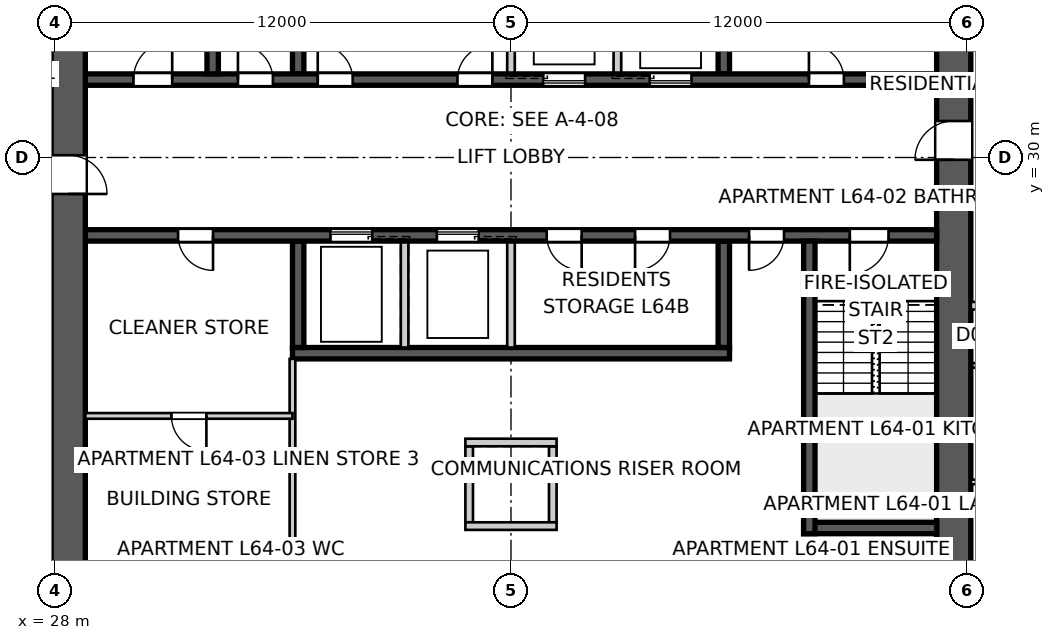
"""IFC4 building model, lengths in metres.
Left out: names, types, materials, properties, quantities, classifications, styles, units other than length and angle.
Written with IfcOpenShell. Run it as: python <this file> out.ifc"""

import sys

from ifc_helpers import new_model, si_unit, direction, frame, frame_2d, origin, place, context, subcontext, project, spatial, polyline, rectangle, outline, extrude, element, fill, save


model = new_model("IFC4")
c1 = context("Model", 3, precision=1e-05, world=origin(), true_north=direction((0.0, 1.0)))
c2 = subcontext(c1, "Body", "Model", "MODEL_VIEW")
j1 = project(units=[si_unit("LENGTHUNIT", "METRE"), si_unit("PLANEANGLEUNIT", "RADIAN")], contexts=[c1])
p1 = place(None, origin())
s1 = spatial("IfcSite", under=j1, at=p1, CompositionType="ELEMENT")
p2 = place(p1, origin())
s2 = spatial("IfcBuilding", under=s1, at=p2, CompositionType="ELEMENT")
p3 = place(p2, frame((0.0, 0.0, 232.0)))
s3 = spatial("IfcBuildingStorey", under=s2, at=p3, CompositionType="ELEMENT", Elevation=232.0)
p4 = place(p3, frame((51.65, 18.8, 0.0), z_axis=(0.0, 0.0, 1.0), x_axis=(0.0, 1.0, 0.0)))
e1 = element("IfcWall", 1, at=p4, inside=s3, PredefinedType="SHEAR", context=c2, shape_type="SweptSolid", body=[
    extrude(outline(polyline([(0.0, -0.45), (22.4, -0.45), (22.4, -0.025), (22.85, -0.025), (22.85, 0.025), (22.4, 0.025), (22.4, 0.45), (0.0, 0.45), (0.0, 0.025), (-0.45, 0.025), (-0.45, -0.025), (0.0, -0.025), (0.0, -0.45)])), origin(), (0.0, 0.0, 1.0), 3.4),
])
p5 = place(p4, frame((11.14, 0.0, 0.0)))
e2 = element("IfcOpeningElement", 2, at=p5, cuts=e1, PredefinedType="OPENING", context=c2, shape_type="SweptSolid", body=[
    extrude(rectangle(XDim=1.02, YDim=2.4, at=frame_2d((0.51, 1.2))), frame((0.0, 0.46, 0.0), z_axis=(0.0, -1.0, 0.0), x_axis=(1.0, 0.0, 0.0)), (0.0, 0.0, 1.0), 0.92),
])
p6 = place(p3, frame((28.35, 41.2, 0.0), z_axis=(0.0, 0.0, 1.0), x_axis=(0.0, -1.0, 0.0)))
e3 = element("IfcWall", 3, at=p6, inside=s3, PredefinedType="SHEAR", context=c2, shape_type="SweptSolid", body=[
    extrude(outline(polyline([(0.0, -0.45), (22.4, -0.45), (22.4, -0.025), (22.85, -0.025), (22.85, 0.025), (22.4, 0.025), (22.4, 0.45), (0.0, 0.45), (0.0, 0.025), (-0.45, 0.025), (-0.45, -0.025), (0.0, -0.025), (0.0, -0.45)])), origin(), (0.0, 0.0, 1.0), 3.4),
])
p7 = place(p6, frame((11.14, 0.0, 0.0)))
e4 = element("IfcOpeningElement", 4, at=p7, cuts=e3, PredefinedType="OPENING", context=c2, shape_type="SweptSolid", body=[
    extrude(rectangle(XDim=1.02, YDim=2.4, at=frame_2d((0.51, 1.2))), frame((0.0, 0.46, 0.0), z_axis=(0.0, -1.0, 0.0), x_axis=(1.0, 0.0, 0.0)), (0.0, 0.0, 1.0), 0.92),
])
p8 = place(p3, frame((28.8, 32.05, 0.0), z_axis=(0.0, 0.0, 1.0), x_axis=(1.0, 0.0, 0.0)))
e5 = element("IfcWall", 5, at=p8, inside=s3, PredefinedType="SHEAR", context=c2, shape_type="SweptSolid", body=[
    extrude(rectangle(XDim=22.4, YDim=0.3, at=frame_2d((11.2, 0.0))), origin(), (0.0, 0.0, 1.0), 3.4),
])
p9 = place(p8, frame((19.04, 0.0, 0.0)))
e6 = element("IfcOpeningElement", 6, at=p9, cuts=e5, PredefinedType="OPENING", context=c2, shape_type="SweptSolid", body=[
    extrude(rectangle(XDim=0.92, YDim=2.1, at=frame_2d((0.46, 1.05))), frame((0.0, 0.16, 0.0), z_axis=(0.0, -1.0, 0.0), x_axis=(1.0, 0.0, 0.0)), (0.0, 0.0, 1.0), 0.32),
])
p10 = place(p8, frame((1.265, 0.0, 0.0)))
e7 = element("IfcOpeningElement", 7, at=p10, cuts=e5, PredefinedType="OPENING", context=c2, shape_type="SweptSolid", body=[
    extrude(rectangle(XDim=1.02, YDim=2.1, at=frame_2d((0.51, 1.05))), frame((0.0, 0.16, 0.0), z_axis=(0.0, -1.0, 0.0), x_axis=(1.0, 0.0, 0.0)), (0.0, 0.0, 1.0), 0.32),
])
p11 = place(p8, frame((4.015, 0.0, 0.0)))
e8 = element("IfcOpeningElement", 8, at=p11, cuts=e5, PredefinedType="OPENING", context=c2, shape_type="SweptSolid", body=[
    extrude(rectangle(XDim=0.92, YDim=2.1, at=frame_2d((0.46, 1.05))), frame((0.0, 0.16, 0.0), z_axis=(0.0, -1.0, 0.0), x_axis=(1.0, 0.0, 0.0)), (0.0, 0.0, 1.0), 0.32),
])
p12 = place(p8, frame((6.115, 0.0, 0.0)))
e9 = element("IfcOpeningElement", 9, at=p12, cuts=e5, PredefinedType="OPENING", context=c2, shape_type="SweptSolid", body=[
    extrude(rectangle(XDim=0.92, YDim=2.1, at=frame_2d((0.46, 1.05))), frame((0.0, 0.16, 0.0), z_axis=(0.0, -1.0, 0.0), x_axis=(1.0, 0.0, 0.0)), (0.0, 0.0, 1.0), 0.32),
])
p13 = place(p8, frame((9.79, 0.0, 0.0)))
e10 = element("IfcOpeningElement", 10, at=p13, cuts=e5, PredefinedType="OPENING", context=c2, shape_type="SweptSolid", body=[
    extrude(rectangle(XDim=0.92, YDim=2.1, at=frame_2d((0.46, 1.05))), frame((0.0, 0.16, 0.0), z_axis=(0.0, -1.0, 0.0), x_axis=(1.0, 0.0, 0.0)), (0.0, 0.0, 1.0), 0.32),
])
p14 = place(p8, frame((12.05, 0.0, 0.0)))
e11 = element("IfcOpeningElement", 11, at=p14, cuts=e5, PredefinedType="OPENING", context=c2, shape_type="SweptSolid", body=[
    extrude(rectangle(XDim=1.1, YDim=2.1, at=frame_2d((0.55, 1.05))), frame((0.0, 0.16, 0.0), z_axis=(0.0, -1.0, 0.0), x_axis=(1.0, 0.0, 0.0)), (0.0, 0.0, 1.0), 0.32),
])
p15 = place(p8, frame((14.85, 0.0, 0.0)))
e12 = element("IfcOpeningElement", 12, at=p15, cuts=e5, PredefinedType="OPENING", context=c2, shape_type="SweptSolid", body=[
    extrude(rectangle(XDim=1.1, YDim=2.1, at=frame_2d((0.55, 1.05))), frame((0.0, 0.16, 0.0), z_axis=(0.0, -1.0, 0.0), x_axis=(1.0, 0.0, 0.0)), (0.0, 0.0, 1.0), 0.32),
])
p16 = place(p3, frame((51.2, 27.95, 0.0), z_axis=(0.0, 0.0, 1.0), x_axis=(-1.0, 0.0, 0.0)))
e13 = element("IfcWall", 13, at=p16, inside=s3, PredefinedType="SHEAR", context=c2, shape_type="SweptSolid", body=[
    extrude(rectangle(XDim=22.4, YDim=0.3, at=frame_2d((11.2, 0.0))), origin(), (0.0, 0.0, 1.0), 3.4),
])
p17 = place(p16, frame((19.04, 0.0, 0.0)))
e14 = element("IfcOpeningElement", 14, at=p17, cuts=e13, PredefinedType="OPENING", context=c2, shape_type="SweptSolid", body=[
    extrude(rectangle(XDim=0.92, YDim=2.1, at=frame_2d((0.46, 1.05))), frame((0.0, 0.16, 0.0), z_axis=(0.0, -1.0, 0.0), x_axis=(1.0, 0.0, 0.0)), (0.0, 0.0, 1.0), 0.32),
])
p18 = place(p16, frame((1.265, 0.0, 0.0)))
e15 = element("IfcOpeningElement", 15, at=p18, cuts=e13, PredefinedType="OPENING", context=c2, shape_type="SweptSolid", body=[
    extrude(rectangle(XDim=1.02, YDim=2.1, at=frame_2d((0.51, 1.05))), frame((0.0, 0.16, 0.0), z_axis=(0.0, -1.0, 0.0), x_axis=(1.0, 0.0, 0.0)), (0.0, 0.0, 1.0), 0.32),
])
p19 = place(p16, frame((4.015, 0.0, 0.0)))
e16 = element("IfcOpeningElement", 16, at=p19, cuts=e13, PredefinedType="OPENING", context=c2, shape_type="SweptSolid", body=[
    extrude(rectangle(XDim=0.92, YDim=2.1, at=frame_2d((0.46, 1.05))), frame((0.0, 0.16, 0.0), z_axis=(0.0, -1.0, 0.0), x_axis=(1.0, 0.0, 0.0)), (0.0, 0.0, 1.0), 0.32),
])
p20 = place(p16, frame((9.34, 0.0, 0.0)))
e17 = element("IfcOpeningElement", 17, at=p20, cuts=e13, PredefinedType="OPENING", context=c2, shape_type="SweptSolid", body=[
    extrude(rectangle(XDim=0.92, YDim=2.1, at=frame_2d((0.46, 1.05))), frame((0.0, 0.16, 0.0), z_axis=(0.0, -1.0, 0.0), x_axis=(1.0, 0.0, 0.0)), (0.0, 0.0, 1.0), 0.32),
])
p21 = place(p16, frame((7.015, 0.0, 0.0)))
e18 = element("IfcOpeningElement", 18, at=p21, cuts=e13, PredefinedType="OPENING", context=c2, shape_type="SweptSolid", body=[
    extrude(rectangle(XDim=0.92, YDim=2.1, at=frame_2d((0.46, 1.05))), frame((0.0, 0.16, 0.0), z_axis=(0.0, -1.0, 0.0), x_axis=(1.0, 0.0, 0.0)), (0.0, 0.0, 1.0), 0.32),
])
p22 = place(p16, frame((12.05, 0.0, 0.0)))
e19 = element("IfcOpeningElement", 19, at=p22, cuts=e13, PredefinedType="OPENING", context=c2, shape_type="SweptSolid", body=[
    extrude(rectangle(XDim=1.1, YDim=2.1, at=frame_2d((0.55, 1.05))), frame((0.0, 0.16, 0.0), z_axis=(0.0, -1.0, 0.0), x_axis=(1.0, 0.0, 0.0)), (0.0, 0.0, 1.0), 0.32),
])
p23 = place(p16, frame((14.85, 0.0, 0.0)))
e20 = element("IfcOpeningElement", 20, at=p23, cuts=e13, PredefinedType="OPENING", context=c2, shape_type="SweptSolid", body=[
    extrude(rectangle(XDim=1.1, YDim=2.1, at=frame_2d((0.55, 1.05))), frame((0.0, 0.16, 0.0), z_axis=(0.0, -1.0, 0.0), x_axis=(1.0, 0.0, 0.0)), (0.0, 0.0, 1.0), 0.32),
])
p24 = place(p3, frame((45.75, 24.85, 0.0), z_axis=(0.0, 0.0, 1.0), x_axis=(-1.0, 0.0, 0.0)))
e21 = element("IfcWall", 21, at=p24, inside=s3, PredefinedType="SHEAR", context=c2, shape_type="SweptSolid", body=[
    extrude(rectangle(XDim=11.5, YDim=0.3, at=frame_2d((5.75, 0.0))), origin(), (0.0, 0.0, 1.0), 3.4),
])
for number, where, z_axis, x_axis in (
    (22, (34.4, 32.2, 0.0), (0.0, 0.0, 1.0), (0.0, 1.0, 0.0)),
    (23, (45.6, 27.8, 0.0), (0.0, 0.0, 1.0), (0.0, -1.0, 0.0)),
):
    element("IfcWall", number, at=place(p3, frame(where, z_axis=z_axis, x_axis=x_axis)), inside=s3, PredefinedType="SHEAR", context=c2, shape_type="SweptSolid", body=[
        extrude(rectangle(XDim=2.8, YDim=0.3, at=frame_2d((1.4, 0.0))), origin(), (0.0, 0.0, 1.0), 3.4),
    ])
for number, where, z_axis, x_axis in (
    (24, (40.0, 32.2, 0.0), (0.0, 0.0, 1.0), (0.0, 1.0, 0.0)),
    (25, (40.0, 27.8, 0.0), (0.0, 0.0, 1.0), (0.0, -1.0, 0.0)),
    (26, (42.8, 32.2, 0.0), (0.0, 0.0, 1.0), (0.0, 1.0, 0.0)),
    (27, (37.2, 27.8, 0.0), (0.0, 0.0, 1.0), (0.0, -1.0, 0.0)),
):
    element("IfcWall", number, at=place(p3, frame(where, z_axis=z_axis, x_axis=x_axis)), inside=s3, PredefinedType="SOLIDWALL", context=c2, shape_type="SweptSolid", body=[
        extrude(rectangle(XDim=2.8, YDim=0.2, at=frame_2d((1.4, 0.0))), origin(), (0.0, 0.0, 1.0), 3.4),
    ])
for number, where, z_axis, x_axis in (
    (28, (45.6, 32.2, 0.0), (0.0, 0.0, 1.0), (0.0, 1.0, 0.0)),
    (29, (34.4, 27.8, 0.0), (0.0, 0.0, 1.0), (0.0, -1.0, 0.0)),
):
    element("IfcWall", number, at=place(p3, frame(where, z_axis=z_axis, x_axis=x_axis)), inside=s3, PredefinedType="SHEAR", context=c2, shape_type="SweptSolid", body=[
        extrude(rectangle(XDim=2.8, YDim=0.3, at=frame_2d((1.4, 0.0))), origin(), (0.0, 0.0, 1.0), 3.4),
    ])
for number, where, z_axis, x_axis in (
    (30, (32.15, 32.2, 0.0), (0.0, 0.0, 1.0), (0.0, 1.0, 0.0)),
    (31, (47.85, 27.8, 0.0), (0.0, 0.0, 1.0), (0.0, -1.0, 0.0)),
):
    element("IfcWall", number, at=place(p3, frame(where, z_axis=z_axis, x_axis=x_axis)), inside=s3, PredefinedType="SHEAR", context=c2, shape_type="SweptSolid", body=[
        extrude(rectangle(XDim=7.7, YDim=0.3, at=frame_2d((3.85, 0.0))), origin(), (0.0, 0.0, 1.0), 3.4),
    ])
p25 = place(p3, frame((51.2, 20.25, 0.0), z_axis=(0.0, 0.0, 1.0), x_axis=(-1.0, 0.0, 0.0)))
e32 = element("IfcWall", 32, at=p25, inside=s3, PredefinedType="SHEAR", context=c2, shape_type="SweptSolid", body=[
    extrude(rectangle(XDim=3.5, YDim=0.3, at=frame_2d((1.75, 0.0))), origin(), (0.0, 0.0, 1.0), 3.4),
])
for number, where, z_axis, x_axis in (
    (33, (38.9, 22.4, 0.0), (0.0, 0.0, 1.0), (0.0, -1.0, 0.0)),
    (34, (41.1, 22.4, 0.0), (0.0, 0.0, 1.0), (0.0, -1.0, 0.0)),
):
    element("IfcWall", number, at=place(p3, frame(where, z_axis=z_axis, x_axis=x_axis)), inside=s3, PredefinedType="SOLIDWALL", context=c2, shape_type="SweptSolid", body=[
        extrude(rectangle(XDim=2.0, YDim=0.2, at=frame_2d((1.0, 0.0))), origin(), (0.0, 0.0, 1.0), 3.4),
    ])
for number, where, z_axis, x_axis in (
    (35, (38.8, 22.5, 0.0), (0.0, 0.0, 1.0), (1.0, 0.0, 0.0)),
    (36, (38.8, 20.3, 0.0), (0.0, 0.0, 1.0), (1.0, 0.0, 0.0)),
):
    element("IfcWall", number, at=place(p3, frame(where, z_axis=z_axis, x_axis=x_axis)), inside=s3, PredefinedType="SOLIDWALL", context=c2, shape_type="SweptSolid", body=[
        extrude(rectangle(XDim=2.4, YDim=0.2, at=frame_2d((1.2, 0.0))), origin(), (0.0, 0.0, 1.0), 3.4),
    ])
p26 = place(p3, frame((52.1, 26.1, 0.0), z_axis=(0.0, 0.0, 1.0), x_axis=(1.0, 0.0, 0.0)))
e37 = element("IfcWall", 37, at=p26, inside=s3, PredefinedType="PARTITIONING", context=c2, shape_type="SweptSolid", body=[
    extrude(rectangle(XDim=3.3, YDim=0.2, at=frame_2d((1.65, 0.0))), origin(), (0.0, 0.0, 1.0), 3.2),
])
p27 = place(p26, frame((1.04, 0.0, 0.0)))
e38 = element("IfcOpeningElement", 38, at=p27, cuts=e37, PredefinedType="OPENING", context=c2, shape_type="SweptSolid", body=[
    extrude(rectangle(XDim=1.02, YDim=2.34, at=frame_2d((0.51, 1.17))), frame((0.0, 0.11, 0.0), z_axis=(0.0, -1.0, 0.0), x_axis=(1.0, 0.0, 0.0)), (0.0, 0.0, 1.0), 0.22),
])
p28 = place(p3, frame((34.25, 18.8, 0.0), z_axis=(0.0, 0.0, 1.0), x_axis=(0.0, 1.0, 0.0)))
e39 = element("IfcWall", 39, at=p28, inside=s3, PredefinedType="SOLIDWALL", context=c2, shape_type="SweptSolid", body=[
    extrude(rectangle(XDim=5.9, YDim=0.15, at=frame_2d((2.95, 0.0))), origin(), (0.0, 0.0, 1.0), 3.2),
])
p29 = place(p3, frame((34.25, 23.2, 0.0), z_axis=(0.0, 0.0, 1.0), x_axis=(-1.0, 0.0, 0.0)))
e40 = element("IfcWall", 40, at=p29, inside=s3, PredefinedType="SOLIDWALL", context=c2, shape_type="SweptSolid", body=[
    extrude(rectangle(XDim=5.45, YDim=0.15, at=frame_2d((2.725, 0.0))), origin(), (0.0, 0.0, 1.0), 3.2),
])
p30 = place(p29, frame((2.265, 0.0, 0.0)))
e41 = element("IfcOpeningElement", 41, at=p30, cuts=e40, PredefinedType="OPENING", context=c2, shape_type="SweptSolid", body=[
    extrude(rectangle(XDim=0.92, YDim=2.1, at=frame_2d((0.46, 1.05))), frame((0.0, 0.085, 0.0), z_axis=(0.0, -1.0, 0.0), x_axis=(1.0, 0.0, 0.0)), (0.0, 0.0, 1.0), 0.17),
])
p31 = place(p3, frame((58.17, 24.528, 0.0), z_axis=(0.0, 0.0, 1.0), x_axis=(-1.0, 0.0, 0.0)))
e42 = element("IfcWall", 42, at=p31, inside=s3, PredefinedType="PARTITIONING", context=c2, shape_type="SweptSolid", body=[
    extrude(rectangle(XDim=6.04, YDim=0.12, at=frame_2d((3.02, 0.0))), origin(), (0.0, 0.0, 1.0), 2.3),
])
p32 = place(p31, frame((2.54, 0.0, 0.0)))
e43 = element("IfcOpeningElement", 43, at=p32, cuts=e42, PredefinedType="OPENING", context=c2, shape_type="SweptSolid", body=[
    extrude(rectangle(XDim=0.96, YDim=2.1, at=frame_2d((0.48, 1.05))), frame((0.0, 0.07, 0.0), z_axis=(0.0, -1.0, 0.0), x_axis=(1.0, 0.0, 0.0)), (0.0, 0.0, 1.0), 0.14),
])
p33 = place(p3, frame((52.1, 21.462, 0.0), z_axis=(0.0, 0.0, 1.0), x_axis=(1.0, 0.0, 0.0)))
e44 = element("IfcWall", 44, at=p33, inside=s3, PredefinedType="PARTITIONING", context=c2, shape_type="SweptSolid", body=[
    extrude(rectangle(XDim=6.1, YDim=0.12, at=frame_2d((3.05, 0.0))), origin(), (0.0, 0.0, 1.0), 3.2),
])
p34 = place(p33, frame((2.42, 0.0, 0.0)))
e45 = element("IfcOpeningElement", 45, at=p34, cuts=e44, PredefinedType="OPENING", context=c2, shape_type="SweptSolid", body=[
    extrude(rectangle(XDim=0.96, YDim=2.1, at=frame_2d((0.48, 1.05))), frame((0.0, 0.07, 0.0), z_axis=(0.0, -1.0, 0.0), x_axis=(1.0, 0.0, 0.0)), (0.0, 0.0, 1.0), 0.14),
])
p35 = place(p9, origin())
e46 = element("IfcDoor", 46, at=p35, inside=s3, OperationType="SINGLE_SWING_LEFT", PredefinedType="DOOR", context=c2, shape_type="SweptSolid", body=[
    extrude(rectangle(XDim=0.92, YDim=2.1, at=frame_2d((0.46, 1.05))), frame((0.0, 0.025, 0.0), z_axis=(0.0, -1.0, 0.0), x_axis=(1.0, 0.0, 0.0)), (0.0, 0.0, 1.0), 0.05),
])
fill(e6, e46)
p36 = place(p17, origin())
e47 = element("IfcDoor", 47, at=p36, inside=s3, OperationType="SINGLE_SWING_LEFT", PredefinedType="DOOR", context=c2, shape_type="SweptSolid", body=[
    extrude(rectangle(XDim=0.92, YDim=2.1, at=frame_2d((0.46, 1.05))), frame((0.0, 0.025, 0.0), z_axis=(0.0, -1.0, 0.0), x_axis=(1.0, 0.0, 0.0)), (0.0, 0.0, 1.0), 0.05),
])
fill(e14, e47)
p37 = place(p18, origin())
e48 = element("IfcDoor", 48, at=p37, inside=s3, OperationType="SINGLE_SWING_RIGHT", PredefinedType="DOOR", context=c2, shape_type="SweptSolid", body=[
    extrude(rectangle(XDim=1.02, YDim=2.1, at=frame_2d((0.51, 1.05))), frame((0.0, 0.025, 0.0), z_axis=(0.0, -1.0, 0.0), x_axis=(1.0, 0.0, 0.0)), (0.0, 0.0, 1.0), 0.05),
])
fill(e15, e48)
p38 = place(p10, origin())
e49 = element("IfcDoor", 49, at=p38, inside=s3, OperationType="SINGLE_SWING_RIGHT", PredefinedType="DOOR", context=c2, shape_type="SweptSolid", body=[
    extrude(rectangle(XDim=1.02, YDim=2.1, at=frame_2d((0.51, 1.05))), frame((0.0, 0.025, 0.0), z_axis=(0.0, -1.0, 0.0), x_axis=(1.0, 0.0, 0.0)), (0.0, 0.0, 1.0), 0.05),
])
fill(e7, e49)
p39 = place(p11, origin())
e50 = element("IfcDoor", 50, at=p39, inside=s3, OperationType="SINGLE_SWING_LEFT", PredefinedType="DOOR", context=c2, shape_type="SweptSolid", body=[
    extrude(rectangle(XDim=0.92, YDim=2.1, at=frame_2d((0.46, 1.05))), frame((0.0, 0.025, 0.0), z_axis=(0.0, -1.0, 0.0), x_axis=(1.0, 0.0, 0.0)), (0.0, 0.0, 1.0), 0.05),
])
fill(e8, e50)
p40 = place(p19, origin())
e51 = element("IfcDoor", 51, at=p40, inside=s3, OperationType="SINGLE_SWING_RIGHT", PredefinedType="DOOR", context=c2, shape_type="SweptSolid", body=[
    extrude(rectangle(XDim=0.92, YDim=2.1, at=frame_2d((0.46, 1.05))), frame((0.0, 0.025, 0.0), z_axis=(0.0, -1.0, 0.0), x_axis=(1.0, 0.0, 0.0)), (0.0, 0.0, 1.0), 0.05),
])
fill(e16, e51)
p41 = place(p30, origin())
e52 = element("IfcDoor", 52, at=p41, inside=s3, OperationType="SINGLE_SWING_LEFT", PredefinedType="DOOR", context=c2, shape_type="SweptSolid", body=[
    extrude(rectangle(XDim=0.92, YDim=2.1, at=frame_2d((0.46, 1.05))), frame((0.0, 0.025, 0.0), z_axis=(0.0, -1.0, 0.0), x_axis=(1.0, 0.0, 0.0)), (0.0, 0.0, 1.0), 0.05),
])
fill(e41, e52)
p42 = place(p12, origin())
e53 = element("IfcDoor", 53, at=p42, inside=s3, OperationType="SINGLE_SWING_LEFT", PredefinedType="DOOR", context=c2, shape_type="SweptSolid", body=[
    extrude(rectangle(XDim=0.92, YDim=2.1, at=frame_2d((0.46, 1.05))), frame((0.0, 0.025, 0.0), z_axis=(0.0, -1.0, 0.0), x_axis=(1.0, 0.0, 0.0)), (0.0, 0.0, 1.0), 0.05),
])
fill(e9, e53)
p43 = place(p13, origin())
e54 = element("IfcDoor", 54, at=p43, inside=s3, OperationType="SINGLE_SWING_RIGHT", PredefinedType="DOOR", context=c2, shape_type="SweptSolid", body=[
    extrude(rectangle(XDim=0.92, YDim=2.1, at=frame_2d((0.46, 1.05))), frame((0.0, 0.025, 0.0), z_axis=(0.0, -1.0, 0.0), x_axis=(1.0, 0.0, 0.0)), (0.0, 0.0, 1.0), 0.05),
])
fill(e10, e54)
p44 = place(p20, origin())
e55 = element("IfcDoor", 55, at=p44, inside=s3, OperationType="SINGLE_SWING_LEFT", PredefinedType="DOOR", context=c2, shape_type="SweptSolid", body=[
    extrude(rectangle(XDim=0.92, YDim=2.1, at=frame_2d((0.46, 1.05))), frame((0.0, 0.025, 0.0), z_axis=(0.0, -1.0, 0.0), x_axis=(1.0, 0.0, 0.0)), (0.0, 0.0, 1.0), 0.05),
])
fill(e17, e55)
p45 = place(p21, origin())
e56 = element("IfcDoor", 56, at=p45, inside=s3, OperationType="SINGLE_SWING_RIGHT", PredefinedType="DOOR", context=c2, shape_type="SweptSolid", body=[
    extrude(rectangle(XDim=0.92, YDim=2.1, at=frame_2d((0.46, 1.05))), frame((0.0, 0.025, 0.0), z_axis=(0.0, -1.0, 0.0), x_axis=(1.0, 0.0, 0.0)), (0.0, 0.0, 1.0), 0.05),
])
fill(e18, e56)
p46 = place(p5, origin())
e57 = element("IfcDoor", 57, at=p46, inside=s3, OperationType="SINGLE_SWING_LEFT", PredefinedType="DOOR", context=c2, shape_type="SweptSolid", body=[
    extrude(rectangle(XDim=1.02, YDim=2.4, at=frame_2d((0.51, 1.2))), frame((0.0, 0.025, 0.0), z_axis=(0.0, -1.0, 0.0), x_axis=(1.0, 0.0, 0.0)), (0.0, 0.0, 1.0), 0.05),
])
fill(e2, e57)
p47 = place(p7, origin())
e58 = element("IfcDoor", 58, at=p47, inside=s3, OperationType="SINGLE_SWING_RIGHT", PredefinedType="DOOR", context=c2, shape_type="SweptSolid", body=[
    extrude(rectangle(XDim=1.02, YDim=2.4, at=frame_2d((0.51, 1.2))), frame((0.0, 0.025, 0.0), z_axis=(0.0, -1.0, 0.0), x_axis=(1.0, 0.0, 0.0)), (0.0, 0.0, 1.0), 0.05),
])
fill(e4, e58)
p48 = place(p14, origin())
e59 = element("IfcDoor", 59, at=p48, inside=s3, OperationType="SLIDING_TO_LEFT", PredefinedType="DOOR", context=c2, shape_type="SweptSolid", body=[
    extrude(rectangle(XDim=1.1, YDim=2.1, at=frame_2d((0.55, 1.05))), frame((0.0, 0.025, 0.0), z_axis=(0.0, -1.0, 0.0), x_axis=(1.0, 0.0, 0.0)), (0.0, 0.0, 1.0), 0.05),
])
fill(e11, e59)
p49 = place(p22, origin())
e60 = element("IfcDoor", 60, at=p49, inside=s3, OperationType="SLIDING_TO_LEFT", PredefinedType="DOOR", context=c2, shape_type="SweptSolid", body=[
    extrude(rectangle(XDim=1.1, YDim=2.1, at=frame_2d((0.55, 1.05))), frame((0.0, 0.025, 0.0), z_axis=(0.0, -1.0, 0.0), x_axis=(1.0, 0.0, 0.0)), (0.0, 0.0, 1.0), 0.05),
])
fill(e19, e60)
p50 = place(p15, origin())
e61 = element("IfcDoor", 61, at=p50, inside=s3, OperationType="SLIDING_TO_LEFT", PredefinedType="DOOR", context=c2, shape_type="SweptSolid", body=[
    extrude(rectangle(XDim=1.1, YDim=2.1, at=frame_2d((0.55, 1.05))), frame((0.0, 0.025, 0.0), z_axis=(0.0, -1.0, 0.0), x_axis=(1.0, 0.0, 0.0)), (0.0, 0.0, 1.0), 0.05),
])
fill(e12, e61)
p51 = place(p23, origin())
e62 = element("IfcDoor", 62, at=p51, inside=s3, OperationType="SLIDING_TO_LEFT", PredefinedType="DOOR", context=c2, shape_type="SweptSolid", body=[
    extrude(rectangle(XDim=1.1, YDim=2.1, at=frame_2d((0.55, 1.05))), frame((0.0, 0.025, 0.0), z_axis=(0.0, -1.0, 0.0), x_axis=(1.0, 0.0, 0.0)), (0.0, 0.0, 1.0), 0.05),
])
fill(e20, e62)
save(model, sys.argv[1])
